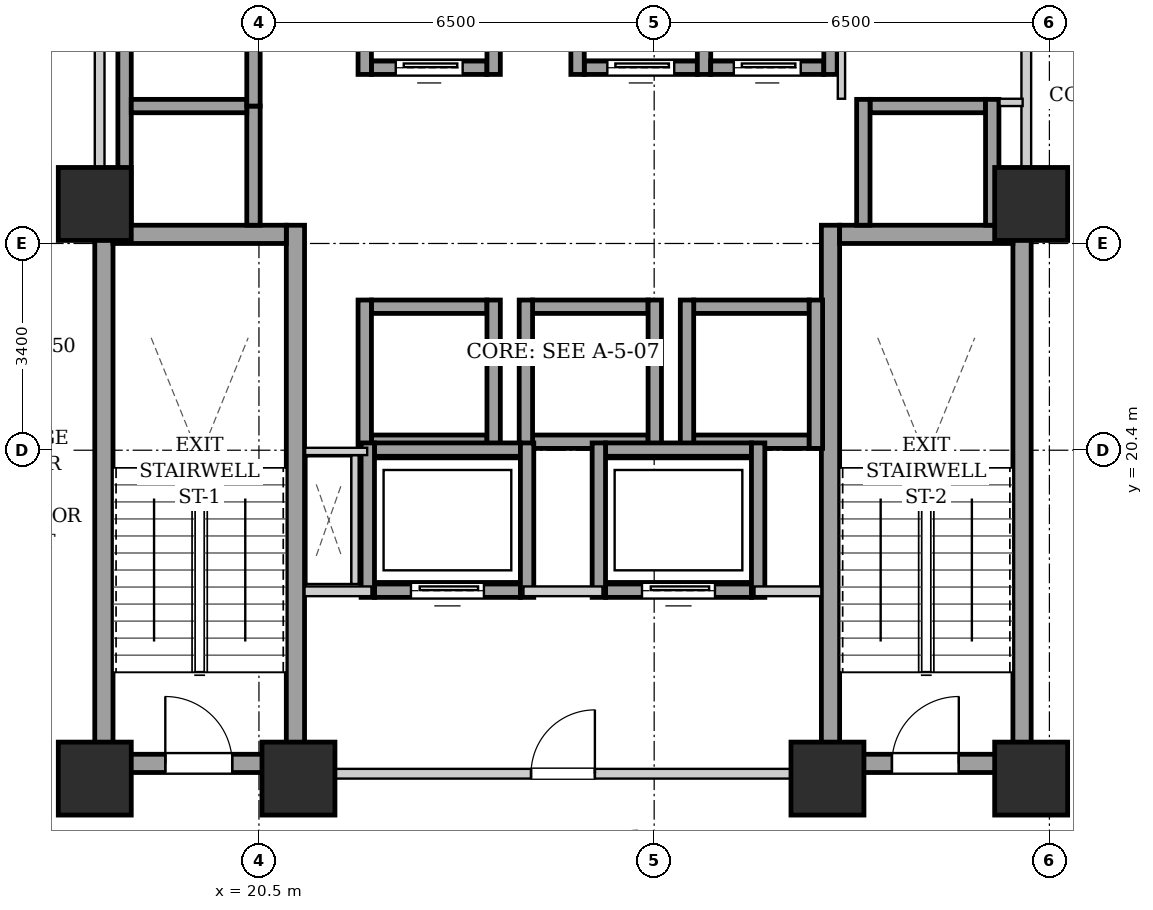
"""IFC4 building model, lengths in metres.
Left out: names, types, materials, properties, quantities, classifications, styles, units other than length and angle.
Written with IfcOpenShell. Run it as: python <this file> out.ifc"""

import sys

from ifc_helpers import new_model, si_unit, direction, frame, frame_2d, origin, origin_2d, place, context, subcontext, project, spatial, rectangle, extrude, element, fill, save


model = new_model("IFC4")
c1 = context("Model", 3, precision=1e-05, world=origin(), true_north=direction((0.0, 1.0)))
c2 = subcontext(c1, "Body", "Model", "MODEL_VIEW")
j1 = project(units=[si_unit("LENGTHUNIT", "METRE"), si_unit("PLANEANGLEUNIT", "RADIAN")], contexts=[c1])
p1 = place(None, origin())
s1 = spatial("IfcSite", under=j1, at=p1, CompositionType="ELEMENT")
p2 = place(p1, origin())
s2 = spatial("IfcBuilding", under=s1, at=p2, CompositionType="ELEMENT")
p3 = place(p2, frame((0.0, 0.0, 70.6)))
s3 = spatial("IfcBuildingStorey", under=s2, at=p3, CompositionType="ELEMENT", Elevation=70.6)
for number, where, z_axis, x_axis in (
    (1, (17.8, 15.0, 0.0), (0.0, 0.0, 1.0), (1.0, 0.0, 0.0)),
    (2, (21.15, 15.0, 0.0), (0.0, 0.0, 1.0), (1.0, 0.0, 0.0)),
    (3, (29.85, 15.0, 0.0), (0.0, 0.0, 1.0), (1.0, 0.0, 0.0)),
    (4, (33.2, 15.0, 0.0), (0.0, 0.0, 1.0), (1.0, 0.0, 0.0)),
    (5, (17.8, 24.45, 0.0), (0.0, 0.0, 1.0), (1.0, 0.0, 0.0)),
    (6, (33.2, 24.45, 0.0), (0.0, 0.0, 1.0), (1.0, 0.0, 0.0)),
):
    element("IfcColumn", number, at=place(p3, frame(where, z_axis=z_axis, x_axis=x_axis)), inside=s3, PredefinedType="COLUMN", context=c2, shape_type="SweptSolid", body=[
        extrude(rectangle(XDim=1.2, YDim=1.2, at=origin_2d()), origin(), (0.0, 0.0, 1.0), 4.5),
    ])
for number, where, z_axis, x_axis in (
    (7, (17.95, 15.1, 0.0), (0.0, 0.0, 1.0), (0.0, 1.0, 0.0)),
    (8, (21.1, 15.1, 0.0), (0.0, 0.0, 1.0), (0.0, 1.0, 0.0)),
):
    element("IfcWall", number, at=place(p3, frame(where, z_axis=z_axis, x_axis=x_axis)), inside=s3, PredefinedType="SHEAR", context=c2, shape_type="SweptSolid", body=[
        extrude(rectangle(XDim=9.0, YDim=0.3, at=frame_2d((4.5, 0.0))), origin(), (0.0, 0.0, 1.0), 4.24),
    ])
p4 = place(p3, frame((18.1, 23.95, 0.0), z_axis=(0.0, 0.0, 1.0), x_axis=(1.0, 0.0, 0.0)))
e9 = element("IfcWall", 9, at=p4, inside=s3, PredefinedType="SHEAR", context=c2, shape_type="SweptSolid", body=[
    extrude(rectangle(XDim=2.85, YDim=0.3, at=frame_2d((1.425, 0.0))), origin(), (0.0, 0.0, 1.0), 4.24),
])
p5 = place(p3, frame((18.1, 15.25, 0.0), z_axis=(0.0, 0.0, 1.0), x_axis=(1.0, 0.0, 0.0)))
e10 = element("IfcWall", 10, at=p5, inside=s3, PredefinedType="SHEAR", context=c2, shape_type="SweptSolid", body=[
    extrude(rectangle(XDim=2.85, YDim=0.3, at=frame_2d((1.425, 0.0))), origin(), (0.0, 0.0, 1.0), 4.24),
])
p6 = place(p5, frame((0.86, 0.0, 0.0)))
e11 = element("IfcOpeningElement", 11, at=p6, cuts=e10, PredefinedType="OPENING", context=c2, shape_type="SweptSolid", body=[
    extrude(rectangle(XDim=1.1, YDim=2.05, at=frame_2d((0.55, 1.025))), frame((0.0, 0.16, 0.0), z_axis=(0.0, -1.0, 0.0), x_axis=(1.0, 0.0, 0.0)), (0.0, 0.0, 1.0), 0.32),
])
for number, where, z_axis, x_axis in (
    (12, (29.9, 15.1, 0.0), (0.0, 0.0, 1.0), (0.0, 1.0, 0.0)),
    (13, (33.05, 15.1, 0.0), (0.0, 0.0, 1.0), (0.0, 1.0, 0.0)),
):
    element("IfcWall", number, at=place(p3, frame(where, z_axis=z_axis, x_axis=x_axis)), inside=s3, PredefinedType="SHEAR", context=c2, shape_type="SweptSolid", body=[
        extrude(rectangle(XDim=9.0, YDim=0.3, at=frame_2d((4.5, 0.0))), origin(), (0.0, 0.0, 1.0), 4.24),
    ])
p7 = place(p3, frame((30.05, 23.95, 0.0), z_axis=(0.0, 0.0, 1.0), x_axis=(1.0, 0.0, 0.0)))
e14 = element("IfcWall", 14, at=p7, inside=s3, PredefinedType="SHEAR", context=c2, shape_type="SweptSolid", body=[
    extrude(rectangle(XDim=2.85, YDim=0.3, at=frame_2d((1.425, 0.0))), origin(), (0.0, 0.0, 1.0), 4.24),
])
p8 = place(p3, frame((30.05, 15.25, 0.0), z_axis=(0.0, 0.0, 1.0), x_axis=(1.0, 0.0, 0.0)))
e15 = element("IfcWall", 15, at=p8, inside=s3, PredefinedType="SHEAR", context=c2, shape_type="SweptSolid", body=[
    extrude(rectangle(XDim=2.85, YDim=0.3, at=frame_2d((1.425, 0.0))), origin(), (0.0, 0.0, 1.0), 4.24),
])
p9 = place(p8, frame((0.86, 0.0, 0.0)))
e16 = element("IfcOpeningElement", 16, at=p9, cuts=e15, PredefinedType="OPENING", context=c2, shape_type="SweptSolid", body=[
    extrude(rectangle(XDim=1.1, YDim=2.05, at=frame_2d((0.55, 1.025))), frame((0.0, 0.16, 0.0), z_axis=(0.0, -1.0, 0.0), x_axis=(1.0, 0.0, 0.0)), (0.0, 0.0, 1.0), 0.32),
])
p10 = place(p3, frame((22.35, 26.69, 0.0), z_axis=(0.0, 0.0, 1.0), x_axis=(1.0, 0.0, 0.0)))
e17 = element("IfcWall", 17, at=p10, inside=s3, PredefinedType="SHEAR", context=c2, shape_type="SweptSolid", body=[
    extrude(rectangle(XDim=1.9, YDim=0.22, at=frame_2d((0.95, 0.0))), origin(), (0.0, 0.0, 1.0), 4.24),
])
p11 = place(p10, frame((0.4, 0.0, 0.0)))
e18 = element("IfcOpeningElement", 18, at=p11, cuts=e17, PredefinedType="OPENING", context=c2, shape_type="SweptSolid", body=[
    extrude(rectangle(XDim=1.1, YDim=2.15, at=frame_2d((0.55, 1.075))), frame((0.0, 0.12, 0.0), z_axis=(0.0, -1.0, 0.0), x_axis=(1.0, 0.0, 0.0)), (0.0, 0.0, 1.0), 0.24),
])
for number, where, z_axis, x_axis in (
    (19, (22.24, 26.58, 0.0), (0.0, 0.0, 1.0), (0.0, 1.0, 0.0)),
    (20, (24.36, 26.58, 0.0), (0.0, 0.0, 1.0), (0.0, 1.0, 0.0)),
):
    element("IfcWall", number, at=place(p3, frame(where, z_axis=z_axis, x_axis=x_axis)), inside=s3, PredefinedType="SHEAR", context=c2, shape_type="SweptSolid", body=[
        extrude(rectangle(XDim=2.44, YDim=0.22, at=frame_2d((1.22, 0.0))), origin(), (0.0, 0.0, 1.0), 4.24),
    ])
p12 = place(p3, frame((25.85, 26.69, 0.0), z_axis=(0.0, 0.0, 1.0), x_axis=(1.0, 0.0, 0.0)))
e21 = element("IfcWall", 21, at=p12, inside=s3, PredefinedType="SHEAR", context=c2, shape_type="SweptSolid", body=[
    extrude(rectangle(XDim=1.86, YDim=0.22, at=frame_2d((0.93, 0.0))), origin(), (0.0, 0.0, 1.0), 4.24),
])
p13 = place(p12, frame((0.38, 0.0, 0.0)))
e22 = element("IfcOpeningElement", 22, at=p13, cuts=e21, PredefinedType="OPENING", context=c2, shape_type="SweptSolid", body=[
    extrude(rectangle(XDim=1.1, YDim=2.15, at=frame_2d((0.55, 1.075))), frame((0.0, 0.12, 0.0), z_axis=(0.0, -1.0, 0.0), x_axis=(1.0, 0.0, 0.0)), (0.0, 0.0, 1.0), 0.24),
])
for number, where, z_axis, x_axis in (
    (23, (25.74, 26.58, 0.0), (0.0, 0.0, 1.0), (0.0, 1.0, 0.0)),
    (24, (27.82, 26.58, 0.0), (0.0, 0.0, 1.0), (0.0, 1.0, 0.0)),
):
    element("IfcWall", number, at=place(p3, frame(where, z_axis=z_axis, x_axis=x_axis)), inside=s3, PredefinedType="SHEAR", context=c2, shape_type="SweptSolid", body=[
        extrude(rectangle(XDim=2.44, YDim=0.22, at=frame_2d((1.22, 0.0))), origin(), (0.0, 0.0, 1.0), 4.24),
    ])
p14 = place(p3, frame((27.93, 26.69, 0.0), z_axis=(0.0, 0.0, 1.0), x_axis=(1.0, 0.0, 0.0)))
e25 = element("IfcWall", 25, at=p14, inside=s3, PredefinedType="SHEAR", context=c2, shape_type="SweptSolid", body=[
    extrude(rectangle(XDim=1.86, YDim=0.22, at=frame_2d((0.93, 0.0))), origin(), (0.0, 0.0, 1.0), 4.24),
])
p15 = place(p14, frame((0.38, 0.0, 0.0)))
e26 = element("IfcOpeningElement", 26, at=p15, cuts=e25, PredefinedType="OPENING", context=c2, shape_type="SweptSolid", body=[
    extrude(rectangle(XDim=1.1, YDim=2.15, at=frame_2d((0.55, 1.075))), frame((0.0, 0.12, 0.0), z_axis=(0.0, -1.0, 0.0), x_axis=(1.0, 0.0, 0.0)), (0.0, 0.0, 1.0), 0.24),
])
p16 = place(p3, frame((29.9, 26.58, 0.0), z_axis=(0.0, 0.0, 1.0), x_axis=(0.0, 1.0, 0.0)))
e27 = element("IfcWall", 27, at=p16, inside=s3, PredefinedType="SHEAR", context=c2, shape_type="SweptSolid", body=[
    extrude(rectangle(XDim=2.44, YDim=0.22, at=frame_2d((1.22, 0.0))), origin(), (0.0, 0.0, 1.0), 4.24),
])
for number, where, z_axis, x_axis in (
    (28, (22.35, 20.54, 0.0), (0.0, 0.0, 1.0), (1.0, 0.0, 0.0)),
    (29, (22.35, 22.76, 0.0), (0.0, 0.0, 1.0), (1.0, 0.0, 0.0)),
):
    element("IfcWall", number, at=place(p3, frame(where, z_axis=z_axis, x_axis=x_axis)), inside=s3, PredefinedType="SHEAR", context=c2, shape_type="SweptSolid", body=[
        extrude(rectangle(XDim=1.9, YDim=0.22, at=frame_2d((0.95, 0.0))), origin(), (0.0, 0.0, 1.0), 4.24),
    ])
for number, where, z_axis, x_axis in (
    (30, (22.24, 20.43, 0.0), (0.0, 0.0, 1.0), (0.0, 1.0, 0.0)),
    (31, (24.36, 20.43, 0.0), (0.0, 0.0, 1.0), (0.0, 1.0, 0.0)),
):
    element("IfcWall", number, at=place(p3, frame(where, z_axis=z_axis, x_axis=x_axis)), inside=s3, PredefinedType="SHEAR", context=c2, shape_type="SweptSolid", body=[
        extrude(rectangle(XDim=2.44, YDim=0.22, at=frame_2d((1.22, 0.0))), origin(), (0.0, 0.0, 1.0), 4.24),
    ])
for number, where, z_axis, x_axis in (
    (32, (25.0, 20.54, 0.0), (0.0, 0.0, 1.0), (1.0, 0.0, 0.0)),
    (33, (25.0, 22.76, 0.0), (0.0, 0.0, 1.0), (1.0, 0.0, 0.0)),
):
    element("IfcWall", number, at=place(p3, frame(where, z_axis=z_axis, x_axis=x_axis)), inside=s3, PredefinedType="SHEAR", context=c2, shape_type="SweptSolid", body=[
        extrude(rectangle(XDim=1.9, YDim=0.22, at=frame_2d((0.95, 0.0))), origin(), (0.0, 0.0, 1.0), 4.24),
    ])
for number, where, z_axis, x_axis in (
    (34, (24.89, 20.43, 0.0), (0.0, 0.0, 1.0), (0.0, 1.0, 0.0)),
    (35, (27.01, 20.43, 0.0), (0.0, 0.0, 1.0), (0.0, 1.0, 0.0)),
):
    element("IfcWall", number, at=place(p3, frame(where, z_axis=z_axis, x_axis=x_axis)), inside=s3, PredefinedType="SHEAR", context=c2, shape_type="SweptSolid", body=[
        extrude(rectangle(XDim=2.44, YDim=0.22, at=frame_2d((1.22, 0.0))), origin(), (0.0, 0.0, 1.0), 4.24),
    ])
for number, where, z_axis, x_axis in (
    (36, (27.65, 20.54, 0.0), (0.0, 0.0, 1.0), (1.0, 0.0, 0.0)),
    (37, (27.65, 22.76, 0.0), (0.0, 0.0, 1.0), (1.0, 0.0, 0.0)),
):
    element("IfcWall", number, at=place(p3, frame(where, z_axis=z_axis, x_axis=x_axis)), inside=s3, PredefinedType="SHEAR", context=c2, shape_type="SweptSolid", body=[
        extrude(rectangle(XDim=1.9, YDim=0.22, at=frame_2d((0.95, 0.0))), origin(), (0.0, 0.0, 1.0), 4.24),
    ])
for number, where, z_axis, x_axis in (
    (38, (27.54, 20.43, 0.0), (0.0, 0.0, 1.0), (0.0, 1.0, 0.0)),
    (39, (29.66, 20.43, 0.0), (0.0, 0.0, 1.0), (0.0, 1.0, 0.0)),
):
    element("IfcWall", number, at=place(p3, frame(where, z_axis=z_axis, x_axis=x_axis)), inside=s3, PredefinedType="SHEAR", context=c2, shape_type="SweptSolid", body=[
        extrude(rectangle(XDim=2.44, YDim=0.22, at=frame_2d((1.22, 0.0))), origin(), (0.0, 0.0, 1.0), 4.24),
    ])
p17 = place(p3, frame((18.29, 24.1, 0.0), z_axis=(0.0, 0.0, 1.0), x_axis=(0.0, 1.0, 0.0)))
e40 = element("IfcWall", 40, at=p17, inside=s3, PredefinedType="SHEAR", context=c2, shape_type="SweptSolid", body=[
    extrude(rectangle(XDim=4.14, YDim=0.22, at=frame_2d((2.07, 0.0))), origin(), (0.0, 0.0, 1.0), 4.24),
])
p18 = place(p3, frame((20.41, 24.1, 0.0), z_axis=(0.0, 0.0, 1.0), x_axis=(0.0, 1.0, 0.0)))
e41 = element("IfcWall", 41, at=p18, inside=s3, PredefinedType="SHEAR", context=c2, shape_type="SweptSolid", body=[
    extrude(rectangle(XDim=1.96, YDim=0.22, at=frame_2d((0.98, 0.0))), origin(), (0.0, 0.0, 1.0), 4.24),
])
p19 = place(p3, frame((18.4, 26.06, 0.0), z_axis=(0.0, 0.0, 1.0), x_axis=(1.0, 0.0, 0.0)))
e42 = element("IfcWall", 42, at=p19, inside=s3, PredefinedType="SHEAR", context=c2, shape_type="SweptSolid", body=[
    extrude(rectangle(XDim=1.9, YDim=0.22, at=frame_2d((0.95, 0.0))), origin(), (0.0, 0.0, 1.0), 4.24),
])
p20 = place(p3, frame((20.41, 26.06, 0.0), z_axis=(0.0, 0.0, 1.0), x_axis=(0.0, 1.0, 0.0)))
e43 = element("IfcWall", 43, at=p20, inside=s3, PredefinedType="SHEAR", context=c2, shape_type="SweptSolid", body=[
    extrude(rectangle(XDim=2.18, YDim=0.22, at=frame_2d((1.09, 0.0))), origin(), (0.0, 0.0, 1.0), 4.24),
])
p21 = place(p3, frame((30.55, 26.06, 0.0), z_axis=(0.0, 0.0, 1.0), x_axis=(1.0, 0.0, 0.0)))
e44 = element("IfcWall", 44, at=p21, inside=s3, PredefinedType="SHEAR", context=c2, shape_type="SweptSolid", body=[
    extrude(rectangle(XDim=1.9, YDim=0.22, at=frame_2d((0.95, 0.0))), origin(), (0.0, 0.0, 1.0), 4.24),
])
for number, where, z_axis, x_axis in (
    (45, (30.44, 24.1, 0.0), (0.0, 0.0, 1.0), (0.0, 1.0, 0.0)),
    (46, (32.56, 24.1, 0.0), (0.0, 0.0, 1.0), (0.0, 1.0, 0.0)),
):
    element("IfcWall", number, at=place(p3, frame(where, z_axis=z_axis, x_axis=x_axis)), inside=s3, PredefinedType="SHEAR", context=c2, shape_type="SweptSolid", body=[
        extrude(rectangle(XDim=2.07, YDim=0.22, at=frame_2d((1.035, 0.0))), origin(), (0.0, 0.0, 1.0), 4.24),
    ])
p22 = place(p3, frame((22.4, 18.09, 0.0), z_axis=(0.0, 0.0, 1.0), x_axis=(1.0, 0.0, 0.0)))
e47 = element("IfcWall", 47, at=p22, inside=s3, PredefinedType="SHEAR", context=c2, shape_type="SweptSolid", body=[
    extrude(rectangle(XDim=2.4, YDim=0.22, at=frame_2d((1.2, 0.0))), origin(), (0.0, 0.0, 1.0), 4.24),
])
p23 = place(p22, frame((0.6, 0.0, 0.0)))
e48 = element("IfcOpeningElement", 48, at=p23, cuts=e47, PredefinedType="OPENING", context=c2, shape_type="SweptSolid", body=[
    extrude(rectangle(XDim=1.2, YDim=2.15, at=frame_2d((0.6, 1.075))), frame((0.0, 0.12, 0.0), z_axis=(0.0, -1.0, 0.0), x_axis=(1.0, 0.0, 0.0)), (0.0, 0.0, 1.0), 0.24),
])
p24 = place(p3, frame((22.4, 20.41, 0.0), z_axis=(0.0, 0.0, 1.0), x_axis=(1.0, 0.0, 0.0)))
e49 = element("IfcWall", 49, at=p24, inside=s3, PredefinedType="SHEAR", context=c2, shape_type="SweptSolid", body=[
    extrude(rectangle(XDim=2.4, YDim=0.22, at=frame_2d((1.2, 0.0))), origin(), (0.0, 0.0, 1.0), 4.24),
])
for number, where, z_axis, x_axis in (
    (50, (22.29, 17.98, 0.0), (0.0, 0.0, 1.0), (0.0, 1.0, 0.0)),
    (51, (24.91, 17.98, 0.0), (0.0, 0.0, 1.0), (0.0, 1.0, 0.0)),
):
    element("IfcWall", number, at=place(p3, frame(where, z_axis=z_axis, x_axis=x_axis)), inside=s3, PredefinedType="SHEAR", context=c2, shape_type="SweptSolid", body=[
        extrude(rectangle(XDim=2.54, YDim=0.22, at=frame_2d((1.27, 0.0))), origin(), (0.0, 0.0, 1.0), 4.24),
    ])
p25 = place(p3, frame((26.2, 18.09, 0.0), z_axis=(0.0, 0.0, 1.0), x_axis=(1.0, 0.0, 0.0)))
e52 = element("IfcWall", 52, at=p25, inside=s3, PredefinedType="SHEAR", context=c2, shape_type="SweptSolid", body=[
    extrude(rectangle(XDim=2.4, YDim=0.22, at=frame_2d((1.2, 0.0))), origin(), (0.0, 0.0, 1.0), 4.24),
])
p26 = place(p25, frame((0.6, 0.0, 0.0)))
e53 = element("IfcOpeningElement", 53, at=p26, cuts=e52, PredefinedType="OPENING", context=c2, shape_type="SweptSolid", body=[
    extrude(rectangle(XDim=1.2, YDim=2.15, at=frame_2d((0.6, 1.075))), frame((0.0, 0.12, 0.0), z_axis=(0.0, -1.0, 0.0), x_axis=(1.0, 0.0, 0.0)), (0.0, 0.0, 1.0), 0.24),
])
p27 = place(p3, frame((26.2, 20.41, 0.0), z_axis=(0.0, 0.0, 1.0), x_axis=(1.0, 0.0, 0.0)))
e54 = element("IfcWall", 54, at=p27, inside=s3, PredefinedType="SHEAR", context=c2, shape_type="SweptSolid", body=[
    extrude(rectangle(XDim=2.4, YDim=0.22, at=frame_2d((1.2, 0.0))), origin(), (0.0, 0.0, 1.0), 4.24),
])
for number, where, z_axis, x_axis in (
    (55, (26.09, 17.98, 0.0), (0.0, 0.0, 1.0), (0.0, 1.0, 0.0)),
    (56, (28.71, 17.98, 0.0), (0.0, 0.0, 1.0), (0.0, 1.0, 0.0)),
):
    element("IfcWall", number, at=place(p3, frame(where, z_axis=z_axis, x_axis=x_axis)), inside=s3, PredefinedType="SHEAR", context=c2, shape_type="SweptSolid", body=[
        extrude(rectangle(XDim=2.54, YDim=0.22, at=frame_2d((1.27, 0.0))), origin(), (0.0, 0.0, 1.0), 4.24),
    ])
p28 = place(p3, frame((21.25, 15.08, 0.0), z_axis=(0.0, 0.0, 1.0), x_axis=(1.0, 0.0, 0.0)))
e57 = element("IfcWall", 57, at=p28, inside=s3, PredefinedType="PARTITIONING", context=c2, shape_type="SweptSolid", body=[
    extrude(rectangle(XDim=8.5, YDim=0.16, at=frame_2d((4.25, 0.0))), origin(), (0.0, 0.0, 1.0), 4.24),
])
p29 = place(p28, frame((3.725, 0.0, 0.0)))
e58 = element("IfcOpeningElement", 58, at=p29, cuts=e57, PredefinedType="OPENING", context=c2, shape_type="SweptSolid", body=[
    extrude(rectangle(XDim=1.05, YDim=2.05, at=frame_2d((0.525, 1.025))), frame((0.0, 0.09, 0.0), z_axis=(0.0, -1.0, 0.0), x_axis=(1.0, 0.0, 0.0)), (0.0, 0.0, 1.0), 0.18),
])
p30 = place(p3, frame((21.25, 18.08, 0.0), z_axis=(0.0, 0.0, 1.0), x_axis=(1.0, 0.0, 0.0)))
e59 = element("IfcWall", 59, at=p30, inside=s3, PredefinedType="PARTITIONING", context=c2, shape_type="SweptSolid", body=[
    extrude(rectangle(XDim=1.1, YDim=0.16, at=frame_2d((0.55, 0.0))), origin(), (0.0, 0.0, 1.0), 4.24),
])
p31 = place(p3, frame((24.85, 18.08, 0.0), z_axis=(0.0, 0.0, 1.0), x_axis=(1.0, 0.0, 0.0)))
e60 = element("IfcWall", 60, at=p31, inside=s3, PredefinedType="PARTITIONING", context=c2, shape_type="SweptSolid", body=[
    extrude(rectangle(XDim=1.3, YDim=0.16, at=frame_2d((0.65, 0.0))), origin(), (0.0, 0.0, 1.0), 4.24),
])
p32 = place(p3, frame((28.65, 18.08, 0.0), z_axis=(0.0, 0.0, 1.0), x_axis=(1.0, 0.0, 0.0)))
e61 = element("IfcWall", 61, at=p32, inside=s3, PredefinedType="PARTITIONING", context=c2, shape_type="SweptSolid", body=[
    extrude(rectangle(XDim=1.1, YDim=0.16, at=frame_2d((0.55, 0.0))), origin(), (0.0, 0.0, 1.0), 4.24),
])
for number, where, z_axis, x_axis in (
    (62, (17.88, 24.12, 0.0), (0.0, 0.0, 1.0), (0.0, 1.0, 0.0)),
    (63, (33.12, 24.12, 0.0), (0.0, 0.0, 1.0), (0.0, 1.0, 0.0)),
):
    element("IfcWall", number, at=place(p3, frame(where, z_axis=z_axis, x_axis=x_axis)), inside=s3, PredefinedType="PARTITIONING", context=c2, shape_type="SweptSolid", body=[
        extrude(rectangle(XDim=4.76, YDim=0.16, at=frame_2d((2.38, 0.0))), origin(), (0.0, 0.0, 1.0), 4.24),
    ])
p33 = place(p3, frame((22.08, 18.2, 0.0), z_axis=(0.0, 0.0, 1.0), x_axis=(0.0, 1.0, 0.0)))
e64 = element("IfcWall", 64, at=p33, inside=s3, PredefinedType="PARTITIONING", context=c2, shape_type="SweptSolid", body=[
    extrude(rectangle(XDim=2.12, YDim=0.12, at=frame_2d((1.06, 0.0))), origin(), (0.0, 0.0, 1.0), 4.24),
])
p34 = place(p3, frame((22.28, 20.38, 0.0), z_axis=(0.0, 0.0, 1.0), x_axis=(-1.0, 0.0, 0.0)))
e65 = element("IfcWall", 65, at=p34, inside=s3, PredefinedType="PARTITIONING", context=c2, shape_type="SweptSolid", body=[
    extrude(rectangle(XDim=1.02, YDim=0.12, at=frame_2d((0.51, 0.0))), origin(), (0.0, 0.0, 1.0), 4.24),
])
p35 = place(p3, frame((30.08, 26.18, 0.0), z_axis=(0.0, 0.0, 1.0), x_axis=(0.0, 1.0, 0.0)))
e66 = element("IfcWall", 66, at=p35, inside=s3, PredefinedType="PARTITIONING", context=c2, shape_type="SweptSolid", body=[
    extrude(rectangle(XDim=2.68, YDim=0.12, at=frame_2d((1.34, 0.0))), origin(), (0.0, 0.0, 1.0), 4.24),
])
p36 = place(p3, frame((32.68, 26.12, 0.0), z_axis=(0.0, 0.0, 1.0), x_axis=(1.0, 0.0, 0.0)))
e67 = element("IfcWall", 67, at=p36, inside=s3, PredefinedType="PARTITIONING", context=c2, shape_type="SweptSolid", body=[
    extrude(rectangle(XDim=0.38, YDim=0.12, at=frame_2d((0.19, 0.0))), origin(), (0.0, 0.0, 1.0), 4.24),
])
p37 = place(p6, origin())
e68 = element("IfcDoor", 68, at=p37, inside=s3, OperationType="SINGLE_SWING_LEFT", PredefinedType="DOOR", context=c2, shape_type="SweptSolid", body=[
    extrude(rectangle(XDim=1.1, YDim=2.05, at=frame_2d((0.55, 1.025))), frame((0.0, 0.025, 0.0), z_axis=(0.0, -1.0, 0.0), x_axis=(1.0, 0.0, 0.0)), (0.0, 0.0, 1.0), 0.05),
])
fill(e11, e68)
p38 = place(p9, origin())
e69 = element("IfcDoor", 69, at=p38, inside=s3, OperationType="SINGLE_SWING_RIGHT", PredefinedType="DOOR", context=c2, shape_type="SweptSolid", body=[
    extrude(rectangle(XDim=1.1, YDim=2.05, at=frame_2d((0.55, 1.025))), frame((0.0, 0.025, 0.0), z_axis=(0.0, -1.0, 0.0), x_axis=(1.0, 0.0, 0.0)), (0.0, 0.0, 1.0), 0.05),
])
fill(e16, e69)
p39 = place(p11, origin())
e70 = element("IfcDoor", 70, at=p39, inside=s3, OperationType="SLIDING_TO_LEFT", PredefinedType="DOOR", context=c2, shape_type="SweptSolid", body=[
    extrude(rectangle(XDim=1.1, YDim=2.15, at=frame_2d((0.55, 1.075))), frame((0.0, 0.025, 0.0), z_axis=(0.0, -1.0, 0.0), x_axis=(1.0, 0.0, 0.0)), (0.0, 0.0, 1.0), 0.05),
])
fill(e18, e70)
p40 = place(p13, origin())
e71 = element("IfcDoor", 71, at=p40, inside=s3, OperationType="SLIDING_TO_LEFT", PredefinedType="DOOR", context=c2, shape_type="SweptSolid", body=[
    extrude(rectangle(XDim=1.1, YDim=2.15, at=frame_2d((0.55, 1.075))), frame((0.0, 0.025, 0.0), z_axis=(0.0, -1.0, 0.0), x_axis=(1.0, 0.0, 0.0)), (0.0, 0.0, 1.0), 0.05),
])
fill(e22, e71)
p41 = place(p15, origin())
e72 = element("IfcDoor", 72, at=p41, inside=s3, OperationType="SLIDING_TO_LEFT", PredefinedType="DOOR", context=c2, shape_type="SweptSolid", body=[
    extrude(rectangle(XDim=1.1, YDim=2.15, at=frame_2d((0.55, 1.075))), frame((0.0, 0.025, 0.0), z_axis=(0.0, -1.0, 0.0), x_axis=(1.0, 0.0, 0.0)), (0.0, 0.0, 1.0), 0.05),
])
fill(e26, e72)
p42 = place(p23, origin())
e73 = element("IfcDoor", 73, at=p42, inside=s3, OperationType="SLIDING_TO_LEFT", PredefinedType="DOOR", context=c2, shape_type="SweptSolid", body=[
    extrude(rectangle(XDim=1.2, YDim=2.15, at=frame_2d((0.6, 1.075))), frame((0.0, 0.025, 0.0), z_axis=(0.0, -1.0, 0.0), x_axis=(1.0, 0.0, 0.0)), (0.0, 0.0, 1.0), 0.05),
])
fill(e48, e73)
p43 = place(p26, origin())
e74 = element("IfcDoor", 74, at=p43, inside=s3, OperationType="SLIDING_TO_LEFT", PredefinedType="DOOR", context=c2, shape_type="SweptSolid", body=[
    extrude(rectangle(XDim=1.2, YDim=2.15, at=frame_2d((0.6, 1.075))), frame((0.0, 0.025, 0.0), z_axis=(0.0, -1.0, 0.0), x_axis=(1.0, 0.0, 0.0)), (0.0, 0.0, 1.0), 0.05),
])
fill(e53, e74)
p44 = place(p29, origin())
e75 = element("IfcDoor", 75, at=p44, inside=s3, OperationType="SINGLE_SWING_RIGHT", PredefinedType="DOOR", context=c2, shape_type="SweptSolid", body=[
    extrude(rectangle(XDim=1.05, YDim=2.05, at=frame_2d((0.525, 1.025))), frame((0.0, 0.025, 0.0), z_axis=(0.0, -1.0, 0.0), x_axis=(1.0, 0.0, 0.0)), (0.0, 0.0, 1.0), 0.05),
])
fill(e58, e75)
save(model, sys.argv[1])
